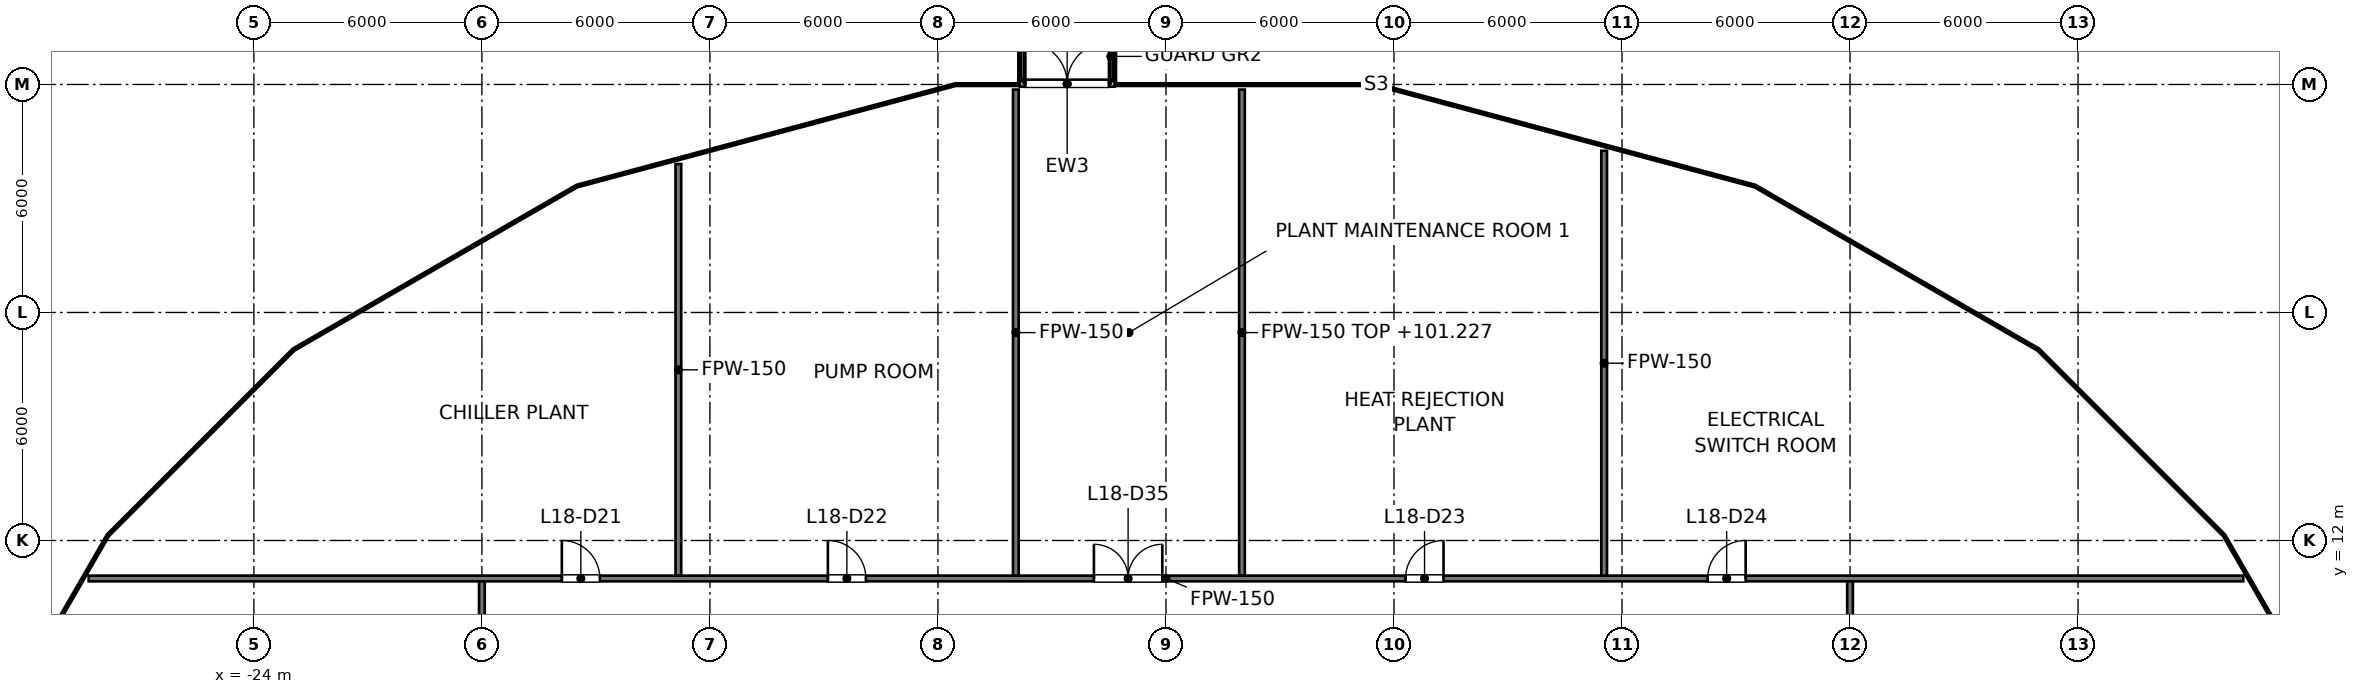
"""IFC4 building model, lengths in metres.
Left out: names, types, materials, properties, quantities, classifications, styles, units other than length and angle.
Written with IfcOpenShell. Run it as: python <this file> out.ifc"""

import sys

from ifc_helpers import new_model, si_unit, direction, frame, frame_2d, origin, place, context, subcontext, project, spatial, rectangle, extrude, element, fill, save


model = new_model("IFC4")
c1 = context("Model", 3, precision=1e-05, world=origin(), true_north=direction((0.0, 1.0)))
c2 = subcontext(c1, "Body", "Model", "MODEL_VIEW")
j1 = project(units=[si_unit("LENGTHUNIT", "METRE"), si_unit("PLANEANGLEUNIT", "RADIAN")], contexts=[c1])
p1 = place(None, origin())
s1 = spatial("IfcSite", under=j1, at=p1, CompositionType="ELEMENT")
p2 = place(p1, origin())
s2 = spatial("IfcBuilding", under=s1, at=p2, CompositionType="ELEMENT")
p3 = place(p2, frame((0.0, 0.0, 96.6)))
s3 = spatial("IfcBuildingStorey", under=s2, at=p3, CompositionType="ELEMENT", Elevation=96.6)
p4 = place(p3, frame((-3.85, 24.016, 0.0), z_axis=(0.0, 0.0, 1.0), x_axis=(1.0, 0.0, 0.0)))
e1 = element("IfcWall", 1, at=p4, inside=s3, PredefinedType="SOLIDWALL", context=c2, shape_type="SweptSolid", body=[
    extrude(rectangle(XDim=2.5, YDim=0.15, at=frame_2d((1.25, 0.0))), origin(), (0.0, 0.0, 1.0), 2.5),
])
p5 = place(p4, frame((0.15, 0.0, 0.0)))
e2 = element("IfcOpeningElement", 2, at=p5, cuts=e1, PredefinedType="OPENING", context=c2, shape_type="SweptSolid", body=[
    extrude(rectangle(XDim=2.2, YDim=2.1, at=frame_2d((1.1, 1.05))), frame((0.0, 0.075, 0.0), z_axis=(0.0, -1.0, 0.0), x_axis=(1.0, 0.0, 0.0)), (0.0, 0.0, 1.0), 0.15),
])
p6 = place(p3, frame((-28.346, 11.0, 0.0), z_axis=(0.0, 0.0, 1.0), x_axis=(1.0, 0.0, 0.0)))
e3 = element("IfcWall", 3, at=p6, inside=s3, PredefinedType="PARTITIONING", context=c2, shape_type="SweptSolid", body=[
    extrude(rectangle(XDim=56.692, YDim=0.15, at=frame_2d((28.346, 0.0))), origin(), (0.0, 0.0, 1.0), 4.327),
])
p7 = place(p6, frame((12.45, 0.0, 0.0)))
e4 = element("IfcOpeningElement", 4, at=p7, cuts=e3, PredefinedType="OPENING", context=c2, shape_type="SweptSolid", body=[
    extrude(rectangle(XDim=1.0, YDim=2.1, at=frame_2d((0.5, 1.05))), frame((0.0, 0.075, 0.0), z_axis=(0.0, -1.0, 0.0), x_axis=(1.0, 0.0, 0.0)), (0.0, 0.0, 1.0), 0.15),
])
p8 = place(p6, frame((19.45, 0.0, 0.0)))
e5 = element("IfcOpeningElement", 5, at=p8, cuts=e3, PredefinedType="OPENING", context=c2, shape_type="SweptSolid", body=[
    extrude(rectangle(XDim=1.0, YDim=2.1, at=frame_2d((0.5, 1.05))), frame((0.0, 0.075, 0.0), z_axis=(0.0, -1.0, 0.0), x_axis=(1.0, 0.0, 0.0)), (0.0, 0.0, 1.0), 0.15),
])
p9 = place(p6, frame((34.65, 0.0, 0.0)))
e6 = element("IfcOpeningElement", 6, at=p9, cuts=e3, PredefinedType="OPENING", context=c2, shape_type="SweptSolid", body=[
    extrude(rectangle(XDim=1.0, YDim=2.1, at=frame_2d((0.5, 1.05))), frame((0.0, 0.075, 0.0), z_axis=(0.0, -1.0, 0.0), x_axis=(1.0, 0.0, 0.0)), (0.0, 0.0, 1.0), 0.15),
])
p10 = place(p6, frame((42.6, 0.0, 0.0)))
e7 = element("IfcOpeningElement", 7, at=p10, cuts=e3, PredefinedType="OPENING", context=c2, shape_type="SweptSolid", body=[
    extrude(rectangle(XDim=1.0, YDim=2.1, at=frame_2d((0.5, 1.05))), frame((0.0, 0.075, 0.0), z_axis=(0.0, -1.0, 0.0), x_axis=(1.0, 0.0, 0.0)), (0.0, 0.0, 1.0), 0.15),
])
p11 = place(p6, frame((26.45, 0.0, 0.0)))
e8 = element("IfcOpeningElement", 8, at=p11, cuts=e3, PredefinedType="OPENING", context=c2, shape_type="SweptSolid", body=[
    extrude(rectangle(XDim=1.8, YDim=2.1, at=frame_2d((0.9, 1.05))), frame((0.0, 0.075, 0.0), z_axis=(0.0, -1.0, 0.0), x_axis=(1.0, 0.0, 0.0)), (0.0, 0.0, 1.0), 0.15),
])
p12 = place(p3, frame((18.0, -10.925, 0.0), z_axis=(0.0, 0.0, 1.0), x_axis=(0.0, 1.0, 0.0)))
e9 = element("IfcWall", 9, at=p12, inside=s3, PredefinedType="PARTITIONING", context=c2, shape_type="SweptSolid", body=[
    extrude(rectangle(XDim=21.85, YDim=0.15, at=frame_2d((10.925, 0.0))), origin(), (0.0, 0.0, 1.0), 4.327),
])
p13 = place(p12, frame((10.425, 0.0, 0.0)))
e10 = element("IfcOpeningElement", 10, at=p13, cuts=e9, PredefinedType="OPENING", context=c2, shape_type="SweptSolid", body=[
    extrude(rectangle(XDim=1.0, YDim=2.1, at=frame_2d((0.5, 1.05))), frame((0.0, 0.075, 0.0), z_axis=(0.0, -1.0, 0.0), x_axis=(1.0, 0.0, 0.0)), (0.0, 0.0, 1.0), 0.15),
])
p14 = place(p3, frame((-18.0, -10.925, 0.0), z_axis=(0.0, 0.0, 1.0), x_axis=(0.0, 1.0, 0.0)))
e11 = element("IfcWall", 11, at=p14, inside=s3, PredefinedType="PARTITIONING", context=c2, shape_type="SweptSolid", body=[
    extrude(rectangle(XDim=21.85, YDim=0.15, at=frame_2d((10.925, 0.0))), origin(), (0.0, 0.0, 1.0), 4.327),
])
p15 = place(p14, frame((10.425, 0.0, 0.0)))
e12 = element("IfcOpeningElement", 12, at=p15, cuts=e11, PredefinedType="OPENING", context=c2, shape_type="SweptSolid", body=[
    extrude(rectangle(XDim=1.0, YDim=2.1, at=frame_2d((0.5, 1.05))), frame((0.0, 0.075, 0.0), z_axis=(0.0, -1.0, 0.0), x_axis=(1.0, 0.0, 0.0)), (0.0, 0.0, 1.0), 0.15),
])
p16 = place(p3, frame((-3.95, 11.075, 0.0), z_axis=(0.0, 0.0, 1.0), x_axis=(0.0, 1.0, 0.0)))
e13 = element("IfcWall", 13, at=p16, inside=s3, PredefinedType="PARTITIONING", context=c2, shape_type="SweptSolid", body=[
    extrude(rectangle(XDim=12.791, YDim=0.15, at=frame_2d((6.396, 0.0))), origin(), (0.0, 0.0, 1.0), 4.327),
])
p17 = place(p3, frame((2.0, 11.075, 0.0), z_axis=(0.0, 0.0, 1.0), x_axis=(0.0, 1.0, 0.0)))
e14 = element("IfcWall", 14, at=p17, inside=s3, PredefinedType="PARTITIONING", context=c2, shape_type="SweptSolid", body=[
    extrude(rectangle(XDim=12.791, YDim=0.15, at=frame_2d((6.396, 0.0))), origin(), (0.0, 0.0, 1.0), 4.627),
])
p18 = place(p3, frame((-12.83, 11.075, 0.0), z_axis=(0.0, 0.0, 1.0), x_axis=(0.0, 1.0, 0.0)))
e15 = element("IfcWall", 15, at=p18, inside=s3, PredefinedType="PARTITIONING", context=c2, shape_type="SweptSolid", body=[
    extrude(rectangle(XDim=10.832, YDim=0.15, at=frame_2d((5.416, 0.0))), origin(), (0.0, 0.0, 1.0), 4.327),
])
p19 = place(p3, frame((11.53, 11.075, 0.0), z_axis=(0.0, 0.0, 1.0), x_axis=(0.0, 1.0, 0.0)))
e16 = element("IfcWall", 16, at=p19, inside=s3, PredefinedType="PARTITIONING", context=c2, shape_type="SweptSolid", body=[
    extrude(rectangle(XDim=11.181, YDim=0.15, at=frame_2d((5.59, 0.0))), origin(), (0.0, 0.0, 1.0), 4.327),
])
p20 = place(p5, origin())
e17 = element("IfcDoor", 17, at=p20, inside=s3, OperationType="DOUBLE_DOOR_SINGLE_SWING", PredefinedType="DOOR", context=c2, shape_type="SweptSolid", body=[
    extrude(rectangle(XDim=2.2, YDim=2.1, at=frame_2d((1.1, 1.05))), frame((0.0, 0.025, 0.0), z_axis=(0.0, -1.0, 0.0), x_axis=(1.0, 0.0, 0.0)), (0.0, 0.0, 1.0), 0.05),
])
fill(e2, e17)
p21 = place(p7, origin())
e18 = element("IfcDoor", 18, at=p21, inside=s3, OperationType="SINGLE_SWING_LEFT", PredefinedType="DOOR", context=c2, shape_type="SweptSolid", body=[
    extrude(rectangle(XDim=1.0, YDim=2.1, at=frame_2d((0.5, 1.05))), frame((0.0, 0.025, 0.0), z_axis=(0.0, -1.0, 0.0), x_axis=(1.0, 0.0, 0.0)), (0.0, 0.0, 1.0), 0.05),
])
fill(e4, e18)
p22 = place(p8, origin())
e19 = element("IfcDoor", 19, at=p22, inside=s3, OperationType="SINGLE_SWING_LEFT", PredefinedType="DOOR", context=c2, shape_type="SweptSolid", body=[
    extrude(rectangle(XDim=1.0, YDim=2.1, at=frame_2d((0.5, 1.05))), frame((0.0, 0.025, 0.0), z_axis=(0.0, -1.0, 0.0), x_axis=(1.0, 0.0, 0.0)), (0.0, 0.0, 1.0), 0.05),
])
fill(e5, e19)
p23 = place(p9, origin())
e20 = element("IfcDoor", 20, at=p23, inside=s3, OperationType="SINGLE_SWING_RIGHT", PredefinedType="DOOR", context=c2, shape_type="SweptSolid", body=[
    extrude(rectangle(XDim=1.0, YDim=2.1, at=frame_2d((0.5, 1.05))), frame((0.0, 0.025, 0.0), z_axis=(0.0, -1.0, 0.0), x_axis=(1.0, 0.0, 0.0)), (0.0, 0.0, 1.0), 0.05),
])
fill(e6, e20)
p24 = place(p10, origin())
e21 = element("IfcDoor", 21, at=p24, inside=s3, OperationType="SINGLE_SWING_RIGHT", PredefinedType="DOOR", context=c2, shape_type="SweptSolid", body=[
    extrude(rectangle(XDim=1.0, YDim=2.1, at=frame_2d((0.5, 1.05))), frame((0.0, 0.025, 0.0), z_axis=(0.0, -1.0, 0.0), x_axis=(1.0, 0.0, 0.0)), (0.0, 0.0, 1.0), 0.05),
])
fill(e7, e21)
p25 = place(p11, origin())
e22 = element("IfcDoor", 22, at=p25, inside=s3, OperationType="DOUBLE_DOOR_SINGLE_SWING", PredefinedType="DOOR", context=c2, shape_type="SweptSolid", body=[
    extrude(rectangle(XDim=1.8, YDim=2.1, at=frame_2d((0.9, 1.05))), frame((0.0, 0.025, 0.0), z_axis=(0.0, -1.0, 0.0), x_axis=(1.0, 0.0, 0.0)), (0.0, 0.0, 1.0), 0.05),
])
fill(e8, e22)
save(model, sys.argv[1])
